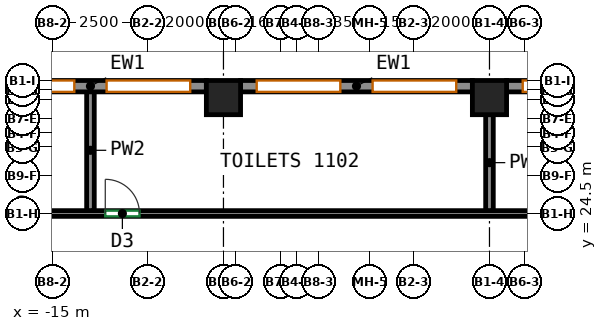
"""IFC4 building model, lengths in metres.
Left out: names, types, materials, properties, quantities, classifications, styles, units other than length and angle.
Written with IfcOpenShell. Run it as: python <this file> out.ifc"""

import sys

from ifc_helpers import new_model, si_unit, direction, frame, frame_2d, origin, origin_2d, place, context, subcontext, project, spatial, rectangle, extrude, source, transform, mapped, element, fill, save


model = new_model("IFC4")
c1 = context("Model", 3, precision=1e-05, world=origin(), true_north=direction((0.0, 1.0)))
c2 = subcontext(c1, "Body", "Model", "MODEL_VIEW")
j1 = project(units=[si_unit("LENGTHUNIT", "METRE"), si_unit("PLANEANGLEUNIT", "RADIAN")], contexts=[c1])
p1 = place(None, origin())
s1 = spatial("IfcSite", under=j1, at=p1, CompositionType="ELEMENT")
p2 = place(p1, origin())
s2 = spatial("IfcBuilding", under=s1, at=p2, CompositionType="ELEMENT")
p3 = place(p2, frame((0.0, 0.0, 51.0)))
s3 = spatial("IfcBuildingStorey", under=s2, at=p3, CompositionType="ELEMENT", Elevation=51.0)
m1 = source(origin(), c2, "Body", "SweptSolid", [
    extrude(rectangle(XDim=0.9, YDim=0.9, at=origin_2d()), origin(), (0.0, 0.0, 1.0), 3.72),
])
for number, where, z_axis, x_axis in (
    (1, (-10.5, 27.55, 0.0), (0.0, 0.0, 1.0), (1.0, 0.0, 0.0)),
    (2, (-3.5, 27.55, 0.0), (0.0, 0.0, 1.0), (1.0, 0.0, 0.0)),
):
    element("IfcColumn", number, at=place(p3, frame(where, z_axis=z_axis, x_axis=x_axis)), inside=s3, PredefinedType="COLUMN", context=c2, shape_type="MappedRepresentation", body=[
        mapped(m1, transform((0.0, 0.0, 0.0))),
    ])
m2 = source(origin(), c2, "Body", "SweptSolid", [
    extrude(rectangle(XDim=6.1, YDim=0.3, at=frame_2d((3.05, 0.0))), origin(), (0.0, 0.0, 1.0), 3.72),
])
p4 = place(p3, frame((3.05, 27.85, 0.0), z_axis=(0.0, 0.0, 1.0), x_axis=(-1.0, 0.0, 0.0)))
e3 = element("IfcWall", 3, at=p4, inside=s3, PredefinedType="SOLIDWALL", context=c2, shape_type="MappedRepresentation", body=[
    mapped(m2, transform((0.0, 0.0, 0.0))),
])
p5 = place(p4, frame((0.425, 0.0, 0.7)))
e4 = element("IfcOpeningElement", 4, at=p5, cuts=e3, PredefinedType="OPENING", context=c2, shape_type="SweptSolid", body=[
    extrude(rectangle(XDim=2.2, YDim=2.25, at=frame_2d((1.1, 1.125))), frame((0.0, 0.16, 0.0), z_axis=(0.0, -1.0, 0.0), x_axis=(1.0, 0.0, 0.0)), (0.0, 0.0, 1.0), 0.32),
])
p6 = place(p4, frame((3.475, 0.0, 0.7)))
e5 = element("IfcOpeningElement", 5, at=p6, cuts=e3, PredefinedType="OPENING", context=c2, shape_type="SweptSolid", body=[
    extrude(rectangle(XDim=2.2, YDim=2.25, at=frame_2d((1.1, 1.125))), frame((0.0, 0.16, 0.0), z_axis=(0.0, -1.0, 0.0), x_axis=(1.0, 0.0, 0.0)), (0.0, 0.0, 1.0), 0.32),
])
p7 = place(p3, frame((-3.95, 27.85, 0.0), z_axis=(0.0, 0.0, 1.0), x_axis=(-1.0, 0.0, 0.0)))
e6 = element("IfcWall", 6, at=p7, inside=s3, PredefinedType="SOLIDWALL", context=c2, shape_type="MappedRepresentation", body=[
    mapped(m2, transform((0.0, 0.0, 0.0))),
])
p8 = place(p7, frame((0.425, 0.0, 0.7)))
e7 = element("IfcOpeningElement", 7, at=p8, cuts=e6, PredefinedType="OPENING", context=c2, shape_type="SweptSolid", body=[
    extrude(rectangle(XDim=2.2, YDim=2.25, at=frame_2d((1.1, 1.125))), frame((0.0, 0.16, 0.0), z_axis=(0.0, -1.0, 0.0), x_axis=(1.0, 0.0, 0.0)), (0.0, 0.0, 1.0), 0.32),
])
p9 = place(p7, frame((3.475, 0.0, 0.7)))
e8 = element("IfcOpeningElement", 8, at=p9, cuts=e6, PredefinedType="OPENING", context=c2, shape_type="SweptSolid", body=[
    extrude(rectangle(XDim=2.2, YDim=2.25, at=frame_2d((1.1, 1.125))), frame((0.0, 0.16, 0.0), z_axis=(0.0, -1.0, 0.0), x_axis=(1.0, 0.0, 0.0)), (0.0, 0.0, 1.0), 0.32),
])
p10 = place(p3, frame((-10.95, 27.85, 0.0), z_axis=(0.0, 0.0, 1.0), x_axis=(-1.0, 0.0, 0.0)))
e9 = element("IfcWall", 9, at=p10, inside=s3, PredefinedType="SOLIDWALL", context=c2, shape_type="MappedRepresentation", body=[
    mapped(m2, transform((0.0, 0.0, 0.0))),
])
p11 = place(p10, frame((0.425, 0.0, 0.7)))
e10 = element("IfcOpeningElement", 10, at=p11, cuts=e9, PredefinedType="OPENING", context=c2, shape_type="SweptSolid", body=[
    extrude(rectangle(XDim=2.2, YDim=2.25, at=frame_2d((1.1, 1.125))), frame((0.0, 0.16, 0.0), z_axis=(0.0, -1.0, 0.0), x_axis=(1.0, 0.0, 0.0)), (0.0, 0.0, 1.0), 0.32),
])
p12 = place(p10, frame((3.475, 0.0, 0.7)))
e11 = element("IfcOpeningElement", 11, at=p12, cuts=e9, PredefinedType="OPENING", context=c2, shape_type="SweptSolid", body=[
    extrude(rectangle(XDim=2.2, YDim=2.25, at=frame_2d((1.1, 1.125))), frame((0.0, 0.16, 0.0), z_axis=(0.0, -1.0, 0.0), x_axis=(1.0, 0.0, 0.0)), (0.0, 0.0, 1.0), 0.32),
])
p13 = place(p3, frame((-19.2, 24.5, 0.0), z_axis=(0.0, 0.0, 1.0), x_axis=(1.0, 0.0, 0.0)))
e12 = element("IfcWall", 12, at=p13, inside=s3, PredefinedType="PARTITIONING", context=c2, shape_type="SweptSolid", body=[
    extrude(rectangle(XDim=40.275, YDim=0.15, at=frame_2d((20.137, 0.0))), origin(), (0.0, 0.0, 1.0), 3.07),
])
p14 = place(p13, frame((3.007, 0.0, 0.0)))
e13 = element("IfcOpeningElement", 13, at=p14, cuts=e12, PredefinedType="OPENING", context=c2, shape_type="SweptSolid", body=[
    extrude(rectangle(XDim=0.9, YDim=2.1, at=frame_2d((0.45, 1.05))), frame((0.0, 0.085, 0.0), z_axis=(0.0, -1.0, 0.0), x_axis=(1.0, 0.0, 0.0)), (0.0, 0.0, 1.0), 0.17),
])
p15 = place(p13, frame((5.59, 0.0, 0.0)))
e14 = element("IfcOpeningElement", 14, at=p15, cuts=e12, PredefinedType="OPENING", context=c2, shape_type="SweptSolid", body=[
    extrude(rectangle(XDim=0.9, YDim=2.1, at=frame_2d((0.45, 1.05))), frame((0.0, 0.085, 0.0), z_axis=(0.0, -1.0, 0.0), x_axis=(1.0, 0.0, 0.0)), (0.0, 0.0, 1.0), 0.17),
])
p16 = place(p13, frame((38.674, 0.0, 0.0)))
e15 = element("IfcOpeningElement", 15, at=p16, cuts=e12, PredefinedType="OPENING", context=c2, shape_type="SweptSolid", body=[
    extrude(rectangle(XDim=1.0, YDim=2.1, at=frame_2d((0.5, 1.05))), frame((0.0, 0.085, 0.0), z_axis=(0.0, -1.0, 0.0), x_axis=(1.0, 0.0, 0.0)), (0.0, 0.0, 1.0), 0.17),
])
p17 = place(p3, frame((-3.5, 24.576, 0.0), z_axis=(0.0, 0.0, 1.0), x_axis=(0.0, 1.0, 0.0)))
e16 = element("IfcWall", 16, at=p17, inside=s3, PredefinedType="PARTITIONING", context=c2, shape_type="SweptSolid", body=[
    extrude(rectangle(XDim=2.524, YDim=0.2, at=frame_2d((1.262, 0.0))), origin(), (0.0, 0.0, 1.0), 3.72),
])
p18 = place(p3, frame((-14.0, 27.75, 0.0), z_axis=(0.0, 0.0, 1.0), x_axis=(0.0, -1.0, 0.0)))
e17 = element("IfcWall", 17, at=p18, inside=s3, PredefinedType="PARTITIONING", context=c2, shape_type="SweptSolid", body=[
    extrude(rectangle(XDim=3.174, YDim=0.2, at=frame_2d((1.587, 0.0))), origin(), (0.0, 0.0, 1.0), 3.72),
])
p19 = place(p6, origin())
e18 = element("IfcWindow", 18, at=p19, inside=s3, PartitioningType="SINGLE_PANEL", PredefinedType="WINDOW", context=c2, shape_type="SweptSolid", body=[
    extrude(rectangle(XDim=2.2, YDim=2.25, at=frame_2d((1.1, 1.125))), frame((0.0, 0.03, 0.0), z_axis=(0.0, -1.0, 0.0), x_axis=(1.0, 0.0, 0.0)), (0.0, 0.0, 1.0), 0.06),
])
fill(e5, e18)
p20 = place(p8, origin())
e19 = element("IfcWindow", 19, at=p20, inside=s3, PartitioningType="SINGLE_PANEL", PredefinedType="WINDOW", context=c2, shape_type="SweptSolid", body=[
    extrude(rectangle(XDim=2.2, YDim=2.25, at=frame_2d((1.1, 1.125))), frame((0.0, 0.03, 0.0), z_axis=(0.0, -1.0, 0.0), x_axis=(1.0, 0.0, 0.0)), (0.0, 0.0, 1.0), 0.06),
])
fill(e7, e19)
p21 = place(p9, origin())
e20 = element("IfcWindow", 20, at=p21, inside=s3, PartitioningType="SINGLE_PANEL", PredefinedType="WINDOW", context=c2, shape_type="SweptSolid", body=[
    extrude(rectangle(XDim=2.2, YDim=2.25, at=frame_2d((1.1, 1.125))), frame((0.0, 0.03, 0.0), z_axis=(0.0, -1.0, 0.0), x_axis=(1.0, 0.0, 0.0)), (0.0, 0.0, 1.0), 0.06),
])
fill(e8, e20)
p22 = place(p11, origin())
e21 = element("IfcWindow", 21, at=p22, inside=s3, PartitioningType="SINGLE_PANEL", PredefinedType="WINDOW", context=c2, shape_type="SweptSolid", body=[
    extrude(rectangle(XDim=2.2, YDim=2.25, at=frame_2d((1.1, 1.125))), frame((0.0, 0.03, 0.0), z_axis=(0.0, -1.0, 0.0), x_axis=(1.0, 0.0, 0.0)), (0.0, 0.0, 1.0), 0.06),
])
fill(e10, e21)
p23 = place(p12, origin())
e22 = element("IfcWindow", 22, at=p23, inside=s3, PartitioningType="SINGLE_PANEL", PredefinedType="WINDOW", context=c2, shape_type="SweptSolid", body=[
    extrude(rectangle(XDim=2.2, YDim=2.25, at=frame_2d((1.1, 1.125))), frame((0.0, 0.03, 0.0), z_axis=(0.0, -1.0, 0.0), x_axis=(1.0, 0.0, 0.0)), (0.0, 0.0, 1.0), 0.06),
])
fill(e11, e22)
p24 = place(p15, origin())
e23 = element("IfcDoor", 23, at=p24, inside=s3, OperationType="SINGLE_SWING_LEFT", PredefinedType="DOOR", context=c2, shape_type="SweptSolid", body=[
    extrude(rectangle(XDim=0.9, YDim=2.1, at=frame_2d((0.45, 1.05))), frame((0.0, 0.025, 0.0), z_axis=(0.0, -1.0, 0.0), x_axis=(1.0, 0.0, 0.0)), (0.0, 0.0, 1.0), 0.05),
])
fill(e14, e23)
save(model, sys.argv[1])
